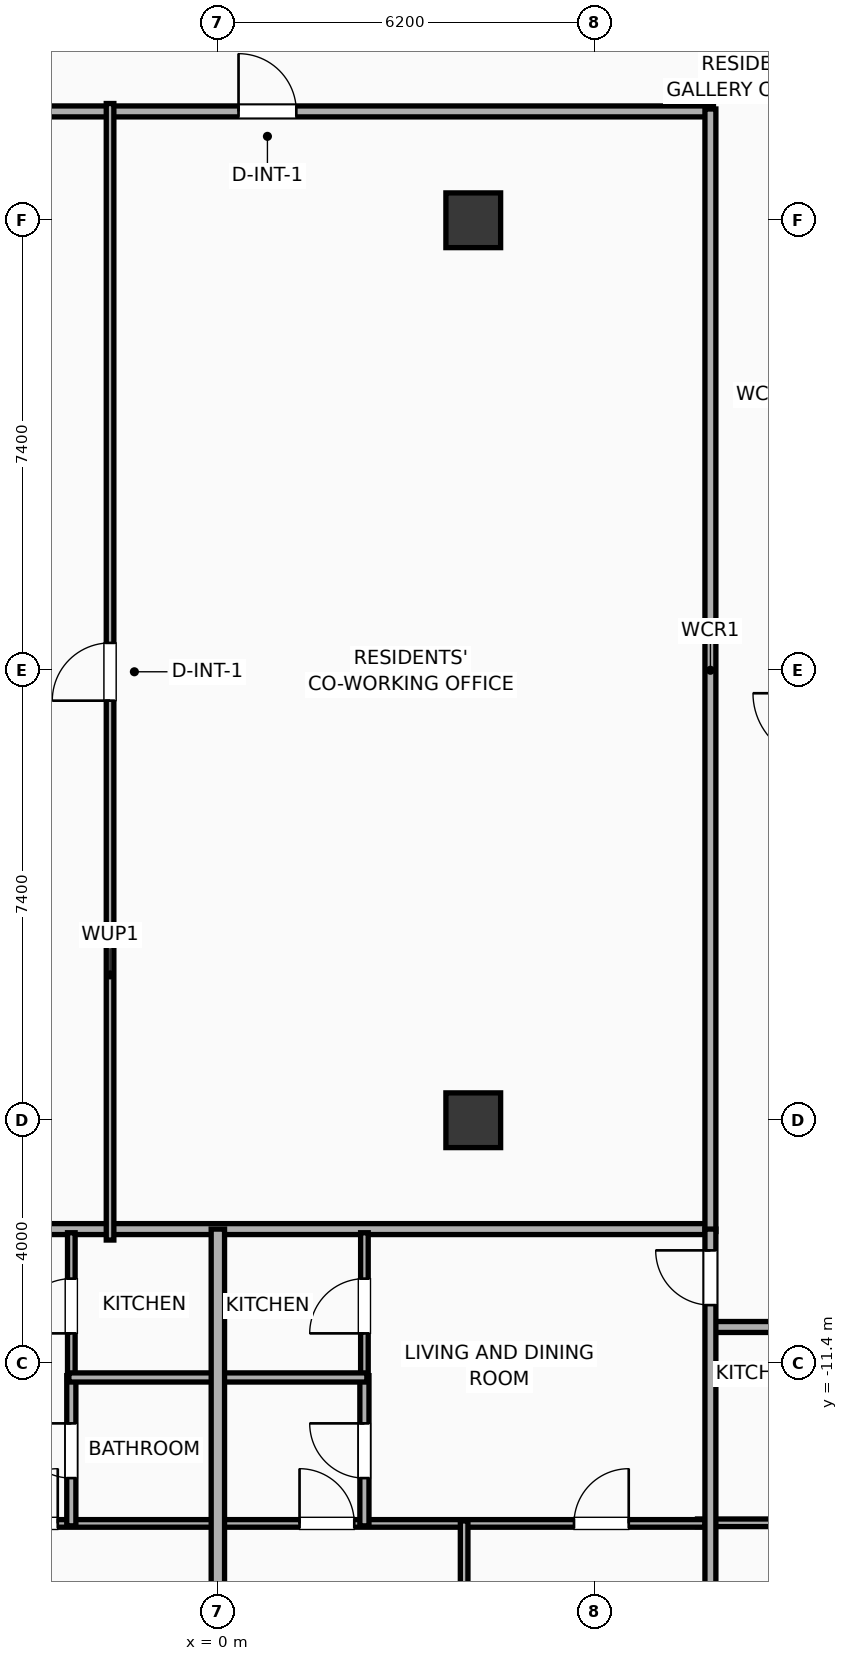
"""IFC4 building model, lengths in metres.
Left out: names, types, materials, properties, quantities, classifications, styles, units other than length and angle.
Written with IfcOpenShell. Run it as: python <this file> out.ifc"""

import sys

from ifc_helpers import new_model, si_unit, direction, frame, frame_2d, origin, origin_2d, place, context, subcontext, project, spatial, rectangle, extrude, element, fill, save


model = new_model("IFC4")
c1 = context("Model", 3, precision=1e-05, world=origin(), true_north=direction((0.0, 1.0)))
c2 = subcontext(c1, "Body", "Model", "MODEL_VIEW")
j1 = project(units=[si_unit("LENGTHUNIT", "METRE"), si_unit("PLANEANGLEUNIT", "RADIAN")], contexts=[c1])
p1 = place(None, origin())
s1 = spatial("IfcSite", under=j1, at=p1, CompositionType="ELEMENT")
p2 = place(p1, origin())
s2 = spatial("IfcBuilding", under=s1, at=p2, CompositionType="ELEMENT")
p3 = place(p2, frame((0.0, 0.0, 275.6)))
s3 = spatial("IfcBuildingStorey", under=s2, at=p3, CompositionType="ELEMENT", Elevation=275.6)
for number, where, z_axis, x_axis in (
    (1, (4.2, -7.4, 0.0), (0.0, 0.0, 1.0), (1.0, 0.0, 0.0)),
    (2, (4.2, 7.4, 0.0), (0.0, 0.0, 1.0), (1.0, 0.0, 0.0)),
):
    element("IfcColumn", number, at=place(p3, frame(where, z_axis=z_axis, x_axis=x_axis)), inside=s3, PredefinedType="COLUMN", context=c2, shape_type="SweptSolid", body=[
        extrude(rectangle(XDim=0.9, YDim=0.9, at=origin_2d()), origin(), (0.0, 0.0, 1.0), 3.9),
    ])
p4 = place(p3, frame((-8.15, 9.19, 0.0), z_axis=(0.0, 0.0, 1.0), x_axis=(1.0, 0.0, 0.0)))
e3 = element("IfcWall", 3, at=p4, inside=s3, PredefinedType="PARTITIONING", context=c2, shape_type="SweptSolid", body=[
    extrude(rectangle(XDim=16.3, YDim=0.18, at=frame_2d((8.15, 0.0))), origin(), (0.0, 0.0, 1.0), 3.65),
])
p5 = place(p4, frame((8.49, 0.0, 0.0)))
e4 = element("IfcOpeningElement", 4, at=p5, cuts=e3, PredefinedType="OPENING", context=c2, shape_type="SweptSolid", body=[
    extrude(rectangle(XDim=0.95, YDim=2.05, at=frame_2d((0.475, 1.025))), frame((0.0, 0.1, 0.0), z_axis=(0.0, -1.0, 0.0), x_axis=(1.0, 0.0, 0.0)), (0.0, 0.0, 1.0), 0.2),
])
p6 = place(p3, frame((-8.15, -9.19, 0.0), z_axis=(0.0, 0.0, 1.0), x_axis=(1.0, 0.0, 0.0)))
e5 = element("IfcWall", 5, at=p6, inside=s3, PredefinedType="PARTITIONING", context=c2, shape_type="SweptSolid", body=[
    extrude(rectangle(XDim=16.3, YDim=0.18, at=frame_2d((8.15, 0.0))), origin(), (0.0, 0.0, 1.0), 3.65),
])
p7 = place(p3, frame((8.1, -9.23, 0.0), z_axis=(0.0, 0.0, 1.0), x_axis=(0.0, 1.0, 0.0)))
e6 = element("IfcWall", 6, at=p7, inside=s3, PredefinedType="PARTITIONING", context=c2, shape_type="SweptSolid", body=[
    extrude(rectangle(XDim=18.46, YDim=0.18, at=frame_2d((9.23, 0.0))), origin(), (0.0, 0.0, 1.0), 3.65),
])
p8 = place(p3, frame((-1.773, -9.37, 0.0), z_axis=(0.0, 0.0, 1.0), x_axis=(0.0, 1.0, 0.0)))
e7 = element("IfcWall", 7, at=p8, inside=s3, PredefinedType="PARTITIONING", context=c2, shape_type="SweptSolid", body=[
    extrude(rectangle(XDim=18.69, YDim=0.125, at=frame_2d((9.345, 0.0))), origin(), (0.0, 0.0, 1.0), 3.65),
])
p9 = place(p8, frame((8.87, 0.0, 0.0)))
e8 = element("IfcOpeningElement", 8, at=p9, cuts=e7, PredefinedType="OPENING", context=c2, shape_type="SweptSolid", body=[
    extrude(rectangle(XDim=0.95, YDim=2.05, at=frame_2d((0.475, 1.025))), frame((0.0, 0.073, 0.0), z_axis=(0.0, -1.0, 0.0), x_axis=(1.0, 0.0, 0.0)), (0.0, 0.0, 1.0), 0.145),
])
p10 = place(p3, frame((7.887, -14.02, 0.0), z_axis=(0.0, 0.0, 1.0), x_axis=(1.0, 0.0, 0.0)))
e9 = element("IfcWall", 9, at=p10, inside=s3, PredefinedType="PARTITIONING", context=c2, shape_type="SweptSolid", body=[
    extrude(rectangle(XDim=2.623, YDim=0.125, at=frame_2d((1.311, 0.0))), origin(), (0.0, 0.0, 1.0), 3.65),
])
p11 = place(p3, frame((8.08, -10.8, 0.0), z_axis=(0.0, 0.0, 1.0), x_axis=(1.0, 0.0, 0.0)))
e10 = element("IfcWall", 10, at=p11, inside=s3, PredefinedType="PARTITIONING", context=c2, shape_type="SweptSolid", body=[
    extrude(rectangle(XDim=15.163, YDim=0.18, at=frame_2d((7.581, 0.0))), origin(), (0.0, 0.0, 1.0), 3.65),
])
p12 = place(p11, frame((3.383, 0.0, 0.0)))
e11 = element("IfcOpeningElement", 11, at=p12, cuts=e10, PredefinedType="OPENING", context=c2, shape_type="SweptSolid", body=[
    extrude(rectangle(XDim=1.15, YDim=2.05, at=frame_2d((0.575, 1.025))), frame((0.0, 0.1, 0.0), z_axis=(0.0, -1.0, 0.0), x_axis=(1.0, 0.0, 0.0)), (0.0, 0.0, 1.0), 0.2),
])
p13 = place(p11, frame((10.996, 0.0, 0.0)))
e12 = element("IfcOpeningElement", 12, at=p13, cuts=e10, PredefinedType="OPENING", context=c2, shape_type="SweptSolid", body=[
    extrude(rectangle(XDim=1.15, YDim=2.05, at=frame_2d((0.575, 1.025))), frame((0.0, 0.1, 0.0), z_axis=(0.0, -1.0, 0.0), x_axis=(1.0, 0.0, 0.0)), (0.0, 0.0, 1.0), 0.2),
])
p14 = place(p3, frame((-8.08, -14.03, 0.0), z_axis=(0.0, 0.0, 1.0), x_axis=(1.0, 0.0, 0.0)))
e13 = element("IfcWall", 13, at=p14, inside=s3, PredefinedType="PARTITIONING", context=c2, shape_type="SweptSolid", body=[
    extrude(rectangle(XDim=8.06, YDim=0.125, at=frame_2d((4.03, 0.0))), origin(), (0.0, 0.0, 1.0), 3.65),
])
p15 = place(p14, frame((1.323, 0.0, 0.0)))
e14 = element("IfcOpeningElement", 14, at=p15, cuts=e13, PredefinedType="OPENING", context=c2, shape_type="SweptSolid", body=[
    extrude(rectangle(XDim=0.9, YDim=2.05, at=frame_2d((0.45, 1.025))), frame((0.0, 0.073, 0.0), z_axis=(0.0, -1.0, 0.0), x_axis=(1.0, 0.0, 0.0)), (0.0, 0.0, 1.0), 0.145),
])
p16 = place(p14, frame((4.547, 0.0, 0.0)))
e15 = element("IfcOpeningElement", 15, at=p16, cuts=e13, PredefinedType="OPENING", context=c2, shape_type="SweptSolid", body=[
    extrude(rectangle(XDim=0.9, YDim=2.05, at=frame_2d((0.45, 1.025))), frame((0.0, 0.073, 0.0), z_axis=(0.0, -1.0, 0.0), x_axis=(1.0, 0.0, 0.0)), (0.0, 0.0, 1.0), 0.145),
])
p17 = place(p3, frame((-2.41, -11.66, 0.0), z_axis=(0.0, 0.0, 1.0), x_axis=(0.0, 1.0, 0.0)))
e16 = element("IfcWall", 16, at=p17, inside=s3, PredefinedType="PARTITIONING", context=c2, shape_type="SweptSolid", body=[
    extrude(rectangle(XDim=2.41, YDim=0.125, at=frame_2d((1.205, 0.0))), origin(), (0.0, 0.0, 1.0), 3.65),
])
p18 = place(p17, frame((0.755, 0.0, 0.0)))
e17 = element("IfcOpeningElement", 17, at=p18, cuts=e16, PredefinedType="OPENING", context=c2, shape_type="SweptSolid", body=[
    extrude(rectangle(XDim=0.9, YDim=2.05, at=frame_2d((0.45, 1.025))), frame((0.0, 0.073, 0.0), z_axis=(0.0, -1.0, 0.0), x_axis=(1.0, 0.0, 0.0)), (0.0, 0.0, 1.0), 0.145),
])
p19 = place(p3, frame((-2.41, -14.07, 0.0), z_axis=(0.0, 0.0, 1.0), x_axis=(0.0, 1.0, 0.0)))
e18 = element("IfcWall", 18, at=p19, inside=s3, PredefinedType="PLUMBINGWALL", context=c2, shape_type="SweptSolid", body=[
    extrude(rectangle(XDim=2.47, YDim=0.15, at=frame_2d((1.235, 0.0))), origin(), (0.0, 0.0, 1.0), 3.65),
])
p20 = place(p19, frame((0.785, 0.0, 0.0)))
e19 = element("IfcOpeningElement", 19, at=p20, cuts=e18, PredefinedType="OPENING", context=c2, shape_type="SweptSolid", body=[
    extrude(rectangle(XDim=0.9, YDim=2.05, at=frame_2d((0.45, 1.025))), frame((0.0, 0.085, 0.0), z_axis=(0.0, -1.0, 0.0), x_axis=(1.0, 0.0, 0.0)), (0.0, 0.0, 1.0), 0.17),
])
p21 = place(p3, frame((-2.45, -11.63, 0.0), z_axis=(0.0, 0.0, 1.0), x_axis=(1.0, 0.0, 0.0)))
e20 = element("IfcWall", 20, at=p21, inside=s3, PredefinedType="PLUMBINGWALL", context=c2, shape_type="SweptSolid", body=[
    extrude(rectangle(XDim=2.43, YDim=0.15, at=frame_2d((1.215, 0.0))), origin(), (0.0, 0.0, 1.0), 3.65),
])
p22 = place(p3, frame((0.02, -14.03, 0.0), z_axis=(0.0, 0.0, 1.0), x_axis=(1.0, 0.0, 0.0)))
e21 = element("IfcWall", 21, at=p22, inside=s3, PredefinedType="PARTITIONING", context=c2, shape_type="SweptSolid", body=[
    extrude(rectangle(XDim=7.992, YDim=0.125, at=frame_2d((3.996, 0.0))), origin(), (0.0, 0.0, 1.0), 3.65),
])
p23 = place(p22, frame((1.323, 0.0, 0.0)))
e22 = element("IfcOpeningElement", 22, at=p23, cuts=e21, PredefinedType="OPENING", context=c2, shape_type="SweptSolid", body=[
    extrude(rectangle(XDim=0.9, YDim=2.05, at=frame_2d((0.45, 1.025))), frame((0.0, 0.073, 0.0), z_axis=(0.0, -1.0, 0.0), x_axis=(1.0, 0.0, 0.0)), (0.0, 0.0, 1.0), 0.145),
])
p24 = place(p22, frame((5.837, 0.0, 0.0)))
e23 = element("IfcOpeningElement", 23, at=p24, cuts=e21, PredefinedType="OPENING", context=c2, shape_type="SweptSolid", body=[
    extrude(rectangle(XDim=0.9, YDim=2.05, at=frame_2d((0.45, 1.025))), frame((0.0, 0.073, 0.0), z_axis=(0.0, -1.0, 0.0), x_axis=(1.0, 0.0, 0.0)), (0.0, 0.0, 1.0), 0.145),
])
p25 = place(p3, frame((2.41, -11.66, 0.0), z_axis=(0.0, 0.0, 1.0), x_axis=(0.0, 1.0, 0.0)))
e24 = element("IfcWall", 24, at=p25, inside=s3, PredefinedType="PARTITIONING", context=c2, shape_type="SweptSolid", body=[
    extrude(rectangle(XDim=2.41, YDim=0.125, at=frame_2d((1.205, 0.0))), origin(), (0.0, 0.0, 1.0), 3.65),
])
p26 = place(p25, frame((0.755, 0.0, 0.0)))
e25 = element("IfcOpeningElement", 25, at=p26, cuts=e24, PredefinedType="OPENING", context=c2, shape_type="SweptSolid", body=[
    extrude(rectangle(XDim=0.9, YDim=2.05, at=frame_2d((0.45, 1.025))), frame((0.0, 0.073, 0.0), z_axis=(0.0, -1.0, 0.0), x_axis=(1.0, 0.0, 0.0)), (0.0, 0.0, 1.0), 0.145),
])
p27 = place(p3, frame((2.41, -14.07, 0.0), z_axis=(0.0, 0.0, 1.0), x_axis=(0.0, 1.0, 0.0)))
e26 = element("IfcWall", 26, at=p27, inside=s3, PredefinedType="PLUMBINGWALL", context=c2, shape_type="SweptSolid", body=[
    extrude(rectangle(XDim=2.47, YDim=0.15, at=frame_2d((1.235, 0.0))), origin(), (0.0, 0.0, 1.0), 3.09),
])
p28 = place(p27, frame((0.785, 0.0, 0.0)))
e27 = element("IfcOpeningElement", 27, at=p28, cuts=e26, PredefinedType="OPENING", context=c2, shape_type="SweptSolid", body=[
    extrude(rectangle(XDim=0.9, YDim=2.05, at=frame_2d((0.45, 1.025))), frame((0.0, 0.085, 0.0), z_axis=(0.0, -1.0, 0.0), x_axis=(1.0, 0.0, 0.0)), (0.0, 0.0, 1.0), 0.17),
])
p29 = place(p3, frame((0.02, -11.63, 0.0), z_axis=(0.0, 0.0, 1.0), x_axis=(1.0, 0.0, 0.0)))
e28 = element("IfcWall", 28, at=p29, inside=s3, PredefinedType="PLUMBINGWALL", context=c2, shape_type="SweptSolid", body=[
    extrude(rectangle(XDim=2.43, YDim=0.15, at=frame_2d((1.215, 0.0))), origin(), (0.0, 0.0, 1.0), 3.65),
])
p30 = place(p3, frame((4.05, -19.432, 0.0), z_axis=(0.0, 0.0, 1.0), x_axis=(0.0, 1.0, 0.0)))
e29 = element("IfcWall", 29, at=p30, inside=s3, PredefinedType="PARTITIONING", context=c2, shape_type="SweptSolid", body=[
    extrude(rectangle(XDim=5.442, YDim=0.125, at=frame_2d((2.721, 0.0))), origin(), (0.0, 0.0, 1.0), 3.65),
])
p31 = place(p3, frame((8.1, -19.857, 0.0), z_axis=(0.0, 0.0, 1.0), x_axis=(0.0, 1.0, 0.0)))
e30 = element("IfcWall", 30, at=p31, inside=s3, PredefinedType="PARTITIONING", context=c2, shape_type="SweptSolid", body=[
    extrude(rectangle(XDim=10.667, YDim=0.18, at=frame_2d((5.333, 0.0))), origin(), (0.0, 0.0, 1.0), 3.65),
])
p32 = place(p31, frame((9.417, 0.0, 0.0)))
e31 = element("IfcOpeningElement", 31, at=p32, cuts=e30, PredefinedType="OPENING", context=c2, shape_type="SweptSolid", body=[
    extrude(rectangle(XDim=0.9, YDim=2.05, at=frame_2d((0.45, 1.025))), frame((0.0, 0.1, 0.0), z_axis=(0.0, -1.0, 0.0), x_axis=(1.0, 0.0, 0.0)), (0.0, 0.0, 1.0), 0.2),
])
p33 = place(p3, frame((0.0, -19.006, 0.0), z_axis=(0.0, 0.0, 1.0), x_axis=(0.0, 1.0, 0.0)))
e32 = element("IfcWall", 32, at=p33, inside=s3, PredefinedType="PARTITIONING", context=c2, shape_type="SweptSolid", body=[
    extrude(rectangle(XDim=9.816, YDim=0.22, at=frame_2d((4.908, 0.0))), origin(), (0.0, 0.0, 1.0), 3.65),
])
p34 = place(p5, origin())
e33 = element("IfcDoor", 33, at=p34, inside=s3, OperationType="SINGLE_SWING_LEFT", PredefinedType="DOOR", context=c2, shape_type="SweptSolid", body=[
    extrude(rectangle(XDim=0.95, YDim=2.05, at=frame_2d((0.475, 1.025))), frame((0.0, 0.025, 0.0), z_axis=(0.0, -1.0, 0.0), x_axis=(1.0, 0.0, 0.0)), (0.0, 0.0, 1.0), 0.05),
])
fill(e4, e33)
p35 = place(p9, origin())
e34 = element("IfcDoor", 34, at=p35, inside=s3, OperationType="SINGLE_SWING_LEFT", PredefinedType="DOOR", context=c2, shape_type="SweptSolid", body=[
    extrude(rectangle(XDim=0.95, YDim=2.05, at=frame_2d((0.475, 1.025))), frame((0.0, 0.025, 0.0), z_axis=(0.0, -1.0, 0.0), x_axis=(1.0, 0.0, 0.0)), (0.0, 0.0, 1.0), 0.05),
])
fill(e8, e34)
p36 = place(p16, origin())
e35 = element("IfcDoor", 35, at=p36, inside=s3, OperationType="SINGLE_SWING_RIGHT", PredefinedType="DOOR", context=c2, shape_type="SweptSolid", body=[
    extrude(rectangle(XDim=0.9, YDim=2.05, at=frame_2d((0.45, 1.025))), frame((0.0, 0.025, 0.0), z_axis=(0.0, -1.0, 0.0), x_axis=(1.0, 0.0, 0.0)), (0.0, 0.0, 1.0), 0.05),
])
fill(e15, e35)
p37 = place(p18, origin())
e36 = element("IfcDoor", 36, at=p37, inside=s3, OperationType="SINGLE_SWING_LEFT", PredefinedType="DOOR", context=c2, shape_type="SweptSolid", body=[
    extrude(rectangle(XDim=0.9, YDim=2.05, at=frame_2d((0.45, 1.025))), frame((0.0, 0.025, 0.0), z_axis=(0.0, -1.0, 0.0), x_axis=(1.0, 0.0, 0.0)), (0.0, 0.0, 1.0), 0.05),
])
fill(e17, e36)
p38 = place(p20, origin())
e37 = element("IfcDoor", 37, at=p38, inside=s3, OperationType="SINGLE_SWING_RIGHT", PredefinedType="DOOR", context=c2, shape_type="SweptSolid", body=[
    extrude(rectangle(XDim=0.9, YDim=2.05, at=frame_2d((0.45, 1.025))), frame((0.0, 0.025, 0.0), z_axis=(0.0, -1.0, 0.0), x_axis=(1.0, 0.0, 0.0)), (0.0, 0.0, 1.0), 0.05),
])
fill(e19, e37)
p39 = place(p23, origin())
e38 = element("IfcDoor", 38, at=p39, inside=s3, OperationType="SINGLE_SWING_LEFT", PredefinedType="DOOR", context=c2, shape_type="SweptSolid", body=[
    extrude(rectangle(XDim=0.9, YDim=2.05, at=frame_2d((0.45, 1.025))), frame((0.0, 0.025, 0.0), z_axis=(0.0, -1.0, 0.0), x_axis=(1.0, 0.0, 0.0)), (0.0, 0.0, 1.0), 0.05),
])
fill(e22, e38)
p40 = place(p24, origin())
e39 = element("IfcDoor", 39, at=p40, inside=s3, OperationType="SINGLE_SWING_RIGHT", PredefinedType="DOOR", context=c2, shape_type="SweptSolid", body=[
    extrude(rectangle(XDim=0.9, YDim=2.05, at=frame_2d((0.45, 1.025))), frame((0.0, 0.025, 0.0), z_axis=(0.0, -1.0, 0.0), x_axis=(1.0, 0.0, 0.0)), (0.0, 0.0, 1.0), 0.05),
])
fill(e23, e39)
p41 = place(p26, origin())
e40 = element("IfcDoor", 40, at=p41, inside=s3, OperationType="SINGLE_SWING_LEFT", PredefinedType="DOOR", context=c2, shape_type="SweptSolid", body=[
    extrude(rectangle(XDim=0.9, YDim=2.05, at=frame_2d((0.45, 1.025))), frame((0.0, 0.025, 0.0), z_axis=(0.0, -1.0, 0.0), x_axis=(1.0, 0.0, 0.0)), (0.0, 0.0, 1.0), 0.05),
])
fill(e25, e40)
p42 = place(p28, origin())
e41 = element("IfcDoor", 41, at=p42, inside=s3, OperationType="SINGLE_SWING_RIGHT", PredefinedType="DOOR", context=c2, shape_type="SweptSolid", body=[
    extrude(rectangle(XDim=0.9, YDim=2.05, at=frame_2d((0.45, 1.025))), frame((0.0, 0.025, 0.0), z_axis=(0.0, -1.0, 0.0), x_axis=(1.0, 0.0, 0.0)), (0.0, 0.0, 1.0), 0.05),
])
fill(e27, e41)
p43 = place(p32, origin())
e42 = element("IfcDoor", 42, at=p43, inside=s3, OperationType="SINGLE_SWING_RIGHT", PredefinedType="DOOR", context=c2, shape_type="SweptSolid", body=[
    extrude(rectangle(XDim=0.9, YDim=2.05, at=frame_2d((0.45, 1.025))), frame((0.0, 0.025, 0.0), z_axis=(0.0, -1.0, 0.0), x_axis=(1.0, 0.0, 0.0)), (0.0, 0.0, 1.0), 0.05),
])
fill(e31, e42)
save(model, sys.argv[1])
